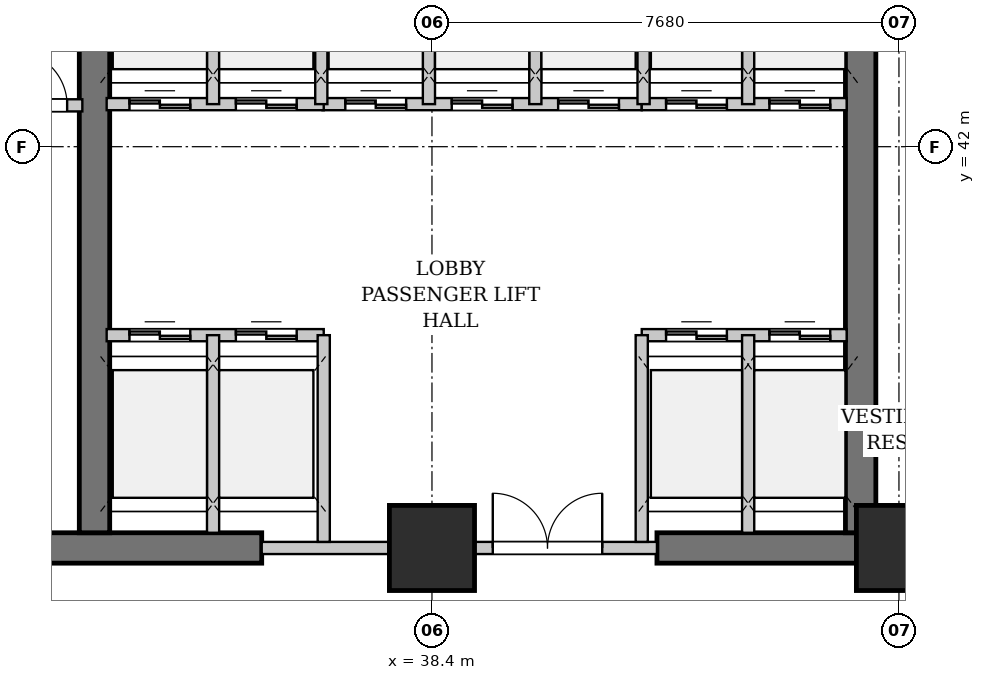
"""IFC4 building model, lengths in metres.
Left out: names, types, materials, properties, quantities, classifications, styles, units other than length and angle.
Written with IfcOpenShell. Run it as: python <this file> out.ifc"""

import sys

from ifc_helpers import new_model, si_unit, direction, frame, frame_2d, origin, origin_2d, place, context, subcontext, project, spatial, rectangle, extrude, element, fill, save


model = new_model("IFC4")
c1 = context("Model", 3, precision=1e-05, world=origin(), true_north=direction((0.0, 1.0)))
c2 = subcontext(c1, "Body", "Model", "MODEL_VIEW")
j1 = project(units=[si_unit("LENGTHUNIT", "METRE"), si_unit("PLANEANGLEUNIT", "RADIAN")], contexts=[c1])
p1 = place(None, origin())
s1 = spatial("IfcSite", under=j1, at=p1, CompositionType="ELEMENT")
p2 = place(p1, origin())
s2 = spatial("IfcBuilding", under=s1, at=p2, CompositionType="ELEMENT")
p3 = place(p2, origin())
s3 = spatial("IfcBuildingStorey", under=s2, at=p3, CompositionType="ELEMENT", Elevation=0.0)
p4 = place(p3, frame((30.72, 35.4, 0.0), z_axis=(0.0, 0.0, 1.0), x_axis=(1.0, 0.0, 0.0)))
e1 = element("IfcWall", 1, at=p4, inside=s3, PredefinedType="SHEAR", context=c2, shape_type="SweptSolid", body=[
    extrude(rectangle(XDim=4.88, YDim=0.5, at=frame_2d((2.44, 0.0))), origin(), (0.0, 0.0, 1.0), 4.94),
])
p5 = place(p3, frame((42.1, 35.4, 0.0), z_axis=(0.0, 0.0, 1.0), x_axis=(1.0, 0.0, 0.0)))
e2 = element("IfcWall", 2, at=p5, inside=s3, PredefinedType="SHEAR", context=c2, shape_type="SweptSolid", body=[
    extrude(rectangle(XDim=8.05, YDim=0.5, at=frame_2d((4.025, 0.0))), origin(), (0.0, 0.0, 1.0), 4.94),
])
p6 = place(p5, frame((4.85, 0.0, 0.0)))
e3 = element("IfcOpeningElement", 3, at=p6, cuts=e2, PredefinedType="OPENING", context=c2, shape_type="SweptSolid", body=[
    extrude(rectangle(XDim=0.9, YDim=2.15, at=frame_2d((0.45, 1.075))), frame((0.0, 0.26, 0.0), z_axis=(0.0, -1.0, 0.0), x_axis=(1.0, 0.0, 0.0)), (0.0, 0.0, 1.0), 0.52),
])
for number, where, z_axis, x_axis in (
    (4, (32.85, 35.65, 0.0), (0.0, 0.0, 1.0), (0.0, 1.0, 0.0)),
    (5, (45.45, 35.65, 0.0), (0.0, 0.0, 1.0), (0.0, 1.0, 0.0)),
):
    element("IfcWall", number, at=place(p3, frame(where, z_axis=z_axis, x_axis=x_axis)), inside=s3, PredefinedType="SHEAR", context=c2, shape_type="SweptSolid", body=[
        extrude(rectangle(XDim=10.3, YDim=0.5, at=frame_2d((5.15, 0.0))), origin(), (0.0, 0.0, 1.0), 4.94),
    ])
for number, where, z_axis, x_axis in (
    (6, (38.4, 35.4, 0.0), (0.0, 0.0, 1.0), (1.0, 0.0, 0.0)),
    (7, (46.08, 35.4, 0.0), (0.0, 0.0, 1.0), (1.0, 0.0, 0.0)),
):
    element("IfcColumn", number, at=place(p3, frame(where, z_axis=z_axis, x_axis=x_axis)), inside=s3, PredefinedType="COLUMN", context=c2, shape_type="SweptSolid", body=[
        extrude(rectangle(XDim=1.4, YDim=1.4, at=origin_2d()), origin(), (0.0, 0.0, 1.0), 5.2),
    ])
p7 = place(p3, frame((27.32, 42.68, 0.0), z_axis=(0.0, 0.0, 1.0), x_axis=(1.0, 0.0, 0.0)))
e8 = element("IfcWall", 8, at=p7, inside=s3, PredefinedType="PARTITIONING", context=c2, shape_type="SweptSolid", body=[
    extrude(rectangle(XDim=5.33, YDim=0.2, at=frame_2d((2.665, 0.0))), origin(), (0.0, 0.0, 1.0), 4.94),
])
p8 = place(p7, frame((4.18, 0.0, 0.0)))
e9 = element("IfcOpeningElement", 9, at=p8, cuts=e8, PredefinedType="OPENING", context=c2, shape_type="SweptSolid", body=[
    extrude(rectangle(XDim=0.9, YDim=2.15, at=frame_2d((0.45, 1.075))), frame((0.0, 0.11, 0.0), z_axis=(0.0, -1.0, 0.0), x_axis=(1.0, 0.0, 0.0)), (0.0, 0.0, 1.0), 0.22),
])
p9 = place(p3, frame((35.6, 35.4, 0.0), z_axis=(0.0, 0.0, 1.0), x_axis=(1.0, 0.0, 0.0)))
e10 = element("IfcWall", 10, at=p9, inside=s3, PredefinedType="PARTITIONING", context=c2, shape_type="SweptSolid", body=[
    extrude(rectangle(XDim=6.5, YDim=0.2, at=frame_2d((3.25, 0.0))), origin(), (0.0, 0.0, 1.0), 3.935),
])
p10 = place(p9, frame((3.8, 0.0, 0.0)))
e11 = element("IfcOpeningElement", 11, at=p10, cuts=e10, PredefinedType="OPENING", context=c2, shape_type="SweptSolid", body=[
    extrude(rectangle(XDim=1.8, YDim=2.3, at=frame_2d((0.9, 1.15))), frame((0.0, 0.11, 0.0), z_axis=(0.0, -1.0, 0.0), x_axis=(1.0, 0.0, 0.0)), (0.0, 0.0, 1.0), 0.22),
])
p11 = place(p3, frame((36.6, 42.7, 0.0), z_axis=(0.0, 0.0, 1.0), x_axis=(1.0, 0.0, 0.0)))
e12 = element("IfcWall", 12, at=p11, inside=s3, PredefinedType="PARTITIONING", context=c2, shape_type="SweptSolid", body=[
    extrude(rectangle(XDim=5.25, YDim=0.2, at=frame_2d((2.625, 0.0))), origin(), (0.0, 0.0, 1.0), 4.94),
])
p12 = place(p11, frame((0.375, 0.0, 0.0)))
e13 = element("IfcOpeningElement", 13, at=p12, cuts=e12, PredefinedType="OPENING", context=c2, shape_type="SweptSolid", body=[
    extrude(rectangle(XDim=1.0, YDim=2.2, at=frame_2d((0.5, 1.1))), frame((0.0, 0.11, 0.0), z_axis=(0.0, -1.0, 0.0), x_axis=(1.0, 0.0, 0.0)), (0.0, 0.0, 1.0), 0.22),
])
p13 = place(p11, frame((2.125, 0.0, 0.0)))
e14 = element("IfcOpeningElement", 14, at=p13, cuts=e12, PredefinedType="OPENING", context=c2, shape_type="SweptSolid", body=[
    extrude(rectangle(XDim=1.0, YDim=2.2, at=frame_2d((0.5, 1.1))), frame((0.0, 0.11, 0.0), z_axis=(0.0, -1.0, 0.0), x_axis=(1.0, 0.0, 0.0)), (0.0, 0.0, 1.0), 0.22),
])
p14 = place(p11, frame((3.875, 0.0, 0.0)))
e15 = element("IfcOpeningElement", 15, at=p14, cuts=e12, PredefinedType="OPENING", context=c2, shape_type="SweptSolid", body=[
    extrude(rectangle(XDim=1.0, YDim=2.2, at=frame_2d((0.5, 1.1))), frame((0.0, 0.11, 0.0), z_axis=(0.0, -1.0, 0.0), x_axis=(1.0, 0.0, 0.0)), (0.0, 0.0, 1.0), 0.22),
])
p15 = place(p3, frame((38.35, 42.7, 0.0), z_axis=(0.0, 0.0, 1.0), x_axis=(0.0, 1.0, 0.0)))
e16 = element("IfcWall", 16, at=p15, inside=s3, PredefinedType="PARTITIONING", context=c2, shape_type="SweptSolid", body=[
    extrude(rectangle(XDim=3.22, YDim=0.2, at=frame_2d((1.61, 0.0))), origin(), (0.0, 0.0, 1.0), 3.935),
])
p16 = place(p3, frame((40.1, 42.7, 0.0), z_axis=(0.0, 0.0, 1.0), x_axis=(0.0, 1.0, 0.0)))
e17 = element("IfcWall", 17, at=p16, inside=s3, PredefinedType="PARTITIONING", context=c2, shape_type="SweptSolid", body=[
    extrude(rectangle(XDim=3.22, YDim=0.2, at=frame_2d((1.61, 0.0))), origin(), (0.0, 0.0, 1.0), 4.94),
])
p17 = place(p3, frame((33.05, 38.9, 0.0), z_axis=(0.0, 0.0, 1.0), x_axis=(1.0, 0.0, 0.0)))
e18 = element("IfcWall", 18, at=p17, inside=s3, PredefinedType="PARTITIONING", context=c2, shape_type="SweptSolid", body=[
    extrude(rectangle(XDim=3.57, YDim=0.2, at=frame_2d((1.785, 0.0))), origin(), (0.0, 0.0, 1.0), 4.94),
])
p18 = place(p17, frame((0.375, 0.0, 0.0)))
e19 = element("IfcOpeningElement", 19, at=p18, cuts=e18, PredefinedType="OPENING", context=c2, shape_type="SweptSolid", body=[
    extrude(rectangle(XDim=1.0, YDim=2.2, at=frame_2d((0.5, 1.1))), frame((0.0, 0.11, 0.0), z_axis=(0.0, -1.0, 0.0), x_axis=(1.0, 0.0, 0.0)), (0.0, 0.0, 1.0), 0.22),
])
p19 = place(p17, frame((2.125, 0.0, 0.0)))
e20 = element("IfcOpeningElement", 20, at=p19, cuts=e18, PredefinedType="OPENING", context=c2, shape_type="SweptSolid", body=[
    extrude(rectangle(XDim=1.0, YDim=2.2, at=frame_2d((0.5, 1.1))), frame((0.0, 0.11, 0.0), z_axis=(0.0, -1.0, 0.0), x_axis=(1.0, 0.0, 0.0)), (0.0, 0.0, 1.0), 0.22),
])
p20 = place(p3, frame((33.05, 42.7, 0.0), z_axis=(0.0, 0.0, 1.0), x_axis=(1.0, 0.0, 0.0)))
e21 = element("IfcWall", 21, at=p20, inside=s3, PredefinedType="PARTITIONING", context=c2, shape_type="SweptSolid", body=[
    extrude(rectangle(XDim=3.57, YDim=0.2, at=frame_2d((1.785, 0.0))), origin(), (0.0, 0.0, 1.0), 4.94),
])
p21 = place(p20, frame((0.375, 0.0, 0.0)))
e22 = element("IfcOpeningElement", 22, at=p21, cuts=e21, PredefinedType="OPENING", context=c2, shape_type="SweptSolid", body=[
    extrude(rectangle(XDim=1.0, YDim=2.2, at=frame_2d((0.5, 1.1))), frame((0.0, 0.11, 0.0), z_axis=(0.0, -1.0, 0.0), x_axis=(1.0, 0.0, 0.0)), (0.0, 0.0, 1.0), 0.22),
])
p22 = place(p20, frame((2.125, 0.0, 0.0)))
e23 = element("IfcOpeningElement", 23, at=p22, cuts=e21, PredefinedType="OPENING", context=c2, shape_type="SweptSolid", body=[
    extrude(rectangle(XDim=1.0, YDim=2.2, at=frame_2d((0.5, 1.1))), frame((0.0, 0.11, 0.0), z_axis=(0.0, -1.0, 0.0), x_axis=(1.0, 0.0, 0.0)), (0.0, 0.0, 1.0), 0.22),
])
p23 = place(p3, frame((34.8, 35.65, 0.0), z_axis=(0.0, 0.0, 1.0), x_axis=(0.0, 1.0, 0.0)))
e24 = element("IfcWall", 24, at=p23, inside=s3, PredefinedType="PARTITIONING", context=c2, shape_type="SweptSolid", body=[
    extrude(rectangle(XDim=3.25, YDim=0.2, at=frame_2d((1.625, 0.0))), origin(), (0.0, 0.0, 1.0), 4.94),
])
p24 = place(p3, frame((34.8, 42.7, 0.0), z_axis=(0.0, 0.0, 1.0), x_axis=(0.0, 1.0, 0.0)))
e25 = element("IfcWall", 25, at=p24, inside=s3, PredefinedType="PARTITIONING", context=c2, shape_type="SweptSolid", body=[
    extrude(rectangle(XDim=3.22, YDim=0.2, at=frame_2d((1.61, 0.0))), origin(), (0.0, 0.0, 1.0), 4.94),
])
p25 = place(p3, frame((36.62, 35.5, 0.0), z_axis=(0.0, 0.0, 1.0), x_axis=(0.0, 1.0, 0.0)))
e26 = element("IfcWall", 26, at=p25, inside=s3, PredefinedType="PARTITIONING", context=c2, shape_type="SweptSolid", body=[
    extrude(rectangle(XDim=3.4, YDim=0.2, at=frame_2d((1.7, 0.0))), origin(), (0.0, 0.0, 1.0), 4.94),
])
p26 = place(p3, frame((36.58, 42.7, 0.0), z_axis=(0.0, 0.0, 1.0), x_axis=(0.0, 1.0, 0.0)))
e27 = element("IfcWall", 27, at=p26, inside=s3, PredefinedType="PARTITIONING", context=c2, shape_type="SweptSolid", body=[
    extrude(rectangle(XDim=3.22, YDim=0.2, at=frame_2d((1.61, 0.0))), origin(), (0.0, 0.0, 1.0), 4.94),
])
p27 = place(p3, frame((41.85, 38.9, 0.0), z_axis=(0.0, 0.0, 1.0), x_axis=(1.0, 0.0, 0.0)))
e28 = element("IfcWall", 28, at=p27, inside=s3, PredefinedType="PARTITIONING", context=c2, shape_type="SweptSolid", body=[
    extrude(rectangle(XDim=3.37, YDim=0.2, at=frame_2d((1.685, 0.0))), origin(), (0.0, 0.0, 1.0), 4.94),
])
p28 = place(p27, frame((0.4, 0.0, 0.0)))
e29 = element("IfcOpeningElement", 29, at=p28, cuts=e28, PredefinedType="OPENING", context=c2, shape_type="SweptSolid", body=[
    extrude(rectangle(XDim=1.0, YDim=2.2, at=frame_2d((0.5, 1.1))), frame((0.0, 0.11, 0.0), z_axis=(0.0, -1.0, 0.0), x_axis=(1.0, 0.0, 0.0)), (0.0, 0.0, 1.0), 0.22),
])
p29 = place(p27, frame((2.1, 0.0, 0.0)))
e30 = element("IfcOpeningElement", 30, at=p29, cuts=e28, PredefinedType="OPENING", context=c2, shape_type="SweptSolid", body=[
    extrude(rectangle(XDim=1.0, YDim=2.2, at=frame_2d((0.5, 1.1))), frame((0.0, 0.11, 0.0), z_axis=(0.0, -1.0, 0.0), x_axis=(1.0, 0.0, 0.0)), (0.0, 0.0, 1.0), 0.22),
])
p30 = place(p3, frame((41.85, 42.7, 0.0), z_axis=(0.0, 0.0, 1.0), x_axis=(1.0, 0.0, 0.0)))
e31 = element("IfcWall", 31, at=p30, inside=s3, PredefinedType="PARTITIONING", context=c2, shape_type="SweptSolid", body=[
    extrude(rectangle(XDim=3.37, YDim=0.2, at=frame_2d((1.685, 0.0))), origin(), (0.0, 0.0, 1.0), 4.94),
])
p31 = place(p30, frame((0.4, 0.0, 0.0)))
e32 = element("IfcOpeningElement", 32, at=p31, cuts=e31, PredefinedType="OPENING", context=c2, shape_type="SweptSolid", body=[
    extrude(rectangle(XDim=1.0, YDim=2.2, at=frame_2d((0.5, 1.1))), frame((0.0, 0.11, 0.0), z_axis=(0.0, -1.0, 0.0), x_axis=(1.0, 0.0, 0.0)), (0.0, 0.0, 1.0), 0.22),
])
p32 = place(p30, frame((2.1, 0.0, 0.0)))
e33 = element("IfcOpeningElement", 33, at=p32, cuts=e31, PredefinedType="OPENING", context=c2, shape_type="SweptSolid", body=[
    extrude(rectangle(XDim=1.0, YDim=2.2, at=frame_2d((0.5, 1.1))), frame((0.0, 0.11, 0.0), z_axis=(0.0, -1.0, 0.0), x_axis=(1.0, 0.0, 0.0)), (0.0, 0.0, 1.0), 0.22),
])
p33 = place(p3, frame((43.6, 35.65, 0.0), z_axis=(0.0, 0.0, 1.0), x_axis=(0.0, 1.0, 0.0)))
e34 = element("IfcWall", 34, at=p33, inside=s3, PredefinedType="PARTITIONING", context=c2, shape_type="SweptSolid", body=[
    extrude(rectangle(XDim=3.25, YDim=0.2, at=frame_2d((1.625, 0.0))), origin(), (0.0, 0.0, 1.0), 4.94),
])
p34 = place(p3, frame((43.6, 42.7, 0.0), z_axis=(0.0, 0.0, 1.0), x_axis=(0.0, 1.0, 0.0)))
e35 = element("IfcWall", 35, at=p34, inside=s3, PredefinedType="PARTITIONING", context=c2, shape_type="SweptSolid", body=[
    extrude(rectangle(XDim=3.22, YDim=0.2, at=frame_2d((1.61, 0.0))), origin(), (0.0, 0.0, 1.0), 4.94),
])
p35 = place(p3, frame((41.85, 35.5, 0.0), z_axis=(0.0, 0.0, 1.0), x_axis=(0.0, 1.0, 0.0)))
e36 = element("IfcWall", 36, at=p35, inside=s3, PredefinedType="PARTITIONING", context=c2, shape_type="SweptSolid", body=[
    extrude(rectangle(XDim=3.4, YDim=0.2, at=frame_2d((1.7, 0.0))), origin(), (0.0, 0.0, 1.0), 4.94),
])
p36 = place(p3, frame((41.88, 42.7, 0.0), z_axis=(0.0, 0.0, 1.0), x_axis=(0.0, 1.0, 0.0)))
e37 = element("IfcWall", 37, at=p36, inside=s3, PredefinedType="PARTITIONING", context=c2, shape_type="SweptSolid", body=[
    extrude(rectangle(XDim=3.22, YDim=0.2, at=frame_2d((1.61, 0.0))), origin(), (0.0, 0.0, 1.0), 4.94),
])
p37 = place(p8, origin())
e38 = element("IfcDoor", 38, at=p37, inside=s3, OperationType="SINGLE_SWING_LEFT", PredefinedType="DOOR", context=c2, shape_type="SweptSolid", body=[
    extrude(rectangle(XDim=0.9, YDim=2.15, at=frame_2d((0.45, 1.075))), frame((0.0, 0.025, 0.0), z_axis=(0.0, -1.0, 0.0), x_axis=(1.0, 0.0, 0.0)), (0.0, 0.0, 1.0), 0.05),
])
fill(e9, e38)
p38 = place(p10, origin())
e39 = element("IfcDoor", 39, at=p38, inside=s3, OperationType="DOUBLE_DOOR_SINGLE_SWING", PredefinedType="DOOR", context=c2, shape_type="SweptSolid", body=[
    extrude(rectangle(XDim=1.8, YDim=2.3, at=frame_2d((0.9, 1.15))), frame((0.0, 0.025, 0.0), z_axis=(0.0, -1.0, 0.0), x_axis=(1.0, 0.0, 0.0)), (0.0, 0.0, 1.0), 0.05),
])
fill(e11, e39)
p39 = place(p12, origin())
e40 = element("IfcDoor", 40, at=p39, inside=s3, OperationType="DOUBLE_DOOR_SLIDING", PredefinedType="DOOR", context=c2, shape_type="SweptSolid", body=[
    extrude(rectangle(XDim=1.0, YDim=2.2, at=frame_2d((0.5, 1.1))), frame((0.0, 0.025, 0.0), z_axis=(0.0, -1.0, 0.0), x_axis=(1.0, 0.0, 0.0)), (0.0, 0.0, 1.0), 0.05),
])
fill(e13, e40)
p40 = place(p13, origin())
e41 = element("IfcDoor", 41, at=p40, inside=s3, OperationType="DOUBLE_DOOR_SLIDING", PredefinedType="DOOR", context=c2, shape_type="SweptSolid", body=[
    extrude(rectangle(XDim=1.0, YDim=2.2, at=frame_2d((0.5, 1.1))), frame((0.0, 0.025, 0.0), z_axis=(0.0, -1.0, 0.0), x_axis=(1.0, 0.0, 0.0)), (0.0, 0.0, 1.0), 0.05),
])
fill(e14, e41)
p41 = place(p14, origin())
e42 = element("IfcDoor", 42, at=p41, inside=s3, OperationType="DOUBLE_DOOR_SLIDING", PredefinedType="DOOR", context=c2, shape_type="SweptSolid", body=[
    extrude(rectangle(XDim=1.0, YDim=2.2, at=frame_2d((0.5, 1.1))), frame((0.0, 0.025, 0.0), z_axis=(0.0, -1.0, 0.0), x_axis=(1.0, 0.0, 0.0)), (0.0, 0.0, 1.0), 0.05),
])
fill(e15, e42)
p42 = place(p18, origin())
e43 = element("IfcDoor", 43, at=p42, inside=s3, OperationType="DOUBLE_DOOR_SLIDING", PredefinedType="DOOR", context=c2, shape_type="SweptSolid", body=[
    extrude(rectangle(XDim=1.0, YDim=2.2, at=frame_2d((0.5, 1.1))), frame((0.0, 0.025, 0.0), z_axis=(0.0, -1.0, 0.0), x_axis=(1.0, 0.0, 0.0)), (0.0, 0.0, 1.0), 0.05),
])
fill(e19, e43)
p43 = place(p19, origin())
e44 = element("IfcDoor", 44, at=p43, inside=s3, OperationType="DOUBLE_DOOR_SLIDING", PredefinedType="DOOR", context=c2, shape_type="SweptSolid", body=[
    extrude(rectangle(XDim=1.0, YDim=2.2, at=frame_2d((0.5, 1.1))), frame((0.0, 0.025, 0.0), z_axis=(0.0, -1.0, 0.0), x_axis=(1.0, 0.0, 0.0)), (0.0, 0.0, 1.0), 0.05),
])
fill(e20, e44)
p44 = place(p21, origin())
e45 = element("IfcDoor", 45, at=p44, inside=s3, OperationType="DOUBLE_DOOR_SLIDING", PredefinedType="DOOR", context=c2, shape_type="SweptSolid", body=[
    extrude(rectangle(XDim=1.0, YDim=2.2, at=frame_2d((0.5, 1.1))), frame((0.0, 0.025, 0.0), z_axis=(0.0, -1.0, 0.0), x_axis=(1.0, 0.0, 0.0)), (0.0, 0.0, 1.0), 0.05),
])
fill(e22, e45)
p45 = place(p22, origin())
e46 = element("IfcDoor", 46, at=p45, inside=s3, OperationType="DOUBLE_DOOR_SLIDING", PredefinedType="DOOR", context=c2, shape_type="SweptSolid", body=[
    extrude(rectangle(XDim=1.0, YDim=2.2, at=frame_2d((0.5, 1.1))), frame((0.0, 0.025, 0.0), z_axis=(0.0, -1.0, 0.0), x_axis=(1.0, 0.0, 0.0)), (0.0, 0.0, 1.0), 0.05),
])
fill(e23, e46)
p46 = place(p28, origin())
e47 = element("IfcDoor", 47, at=p46, inside=s3, OperationType="DOUBLE_DOOR_SLIDING", PredefinedType="DOOR", context=c2, shape_type="SweptSolid", body=[
    extrude(rectangle(XDim=1.0, YDim=2.2, at=frame_2d((0.5, 1.1))), frame((0.0, 0.025, 0.0), z_axis=(0.0, -1.0, 0.0), x_axis=(1.0, 0.0, 0.0)), (0.0, 0.0, 1.0), 0.05),
])
fill(e29, e47)
p47 = place(p29, origin())
e48 = element("IfcDoor", 48, at=p47, inside=s3, OperationType="DOUBLE_DOOR_SLIDING", PredefinedType="DOOR", context=c2, shape_type="SweptSolid", body=[
    extrude(rectangle(XDim=1.0, YDim=2.2, at=frame_2d((0.5, 1.1))), frame((0.0, 0.025, 0.0), z_axis=(0.0, -1.0, 0.0), x_axis=(1.0, 0.0, 0.0)), (0.0, 0.0, 1.0), 0.05),
])
fill(e30, e48)
p48 = place(p31, origin())
e49 = element("IfcDoor", 49, at=p48, inside=s3, OperationType="DOUBLE_DOOR_SLIDING", PredefinedType="DOOR", context=c2, shape_type="SweptSolid", body=[
    extrude(rectangle(XDim=1.0, YDim=2.2, at=frame_2d((0.5, 1.1))), frame((0.0, 0.025, 0.0), z_axis=(0.0, -1.0, 0.0), x_axis=(1.0, 0.0, 0.0)), (0.0, 0.0, 1.0), 0.05),
])
fill(e32, e49)
p49 = place(p32, origin())
e50 = element("IfcDoor", 50, at=p49, inside=s3, OperationType="DOUBLE_DOOR_SLIDING", PredefinedType="DOOR", context=c2, shape_type="SweptSolid", body=[
    extrude(rectangle(XDim=1.0, YDim=2.2, at=frame_2d((0.5, 1.1))), frame((0.0, 0.025, 0.0), z_axis=(0.0, -1.0, 0.0), x_axis=(1.0, 0.0, 0.0)), (0.0, 0.0, 1.0), 0.05),
])
fill(e33, e50)
save(model, sys.argv[1])
